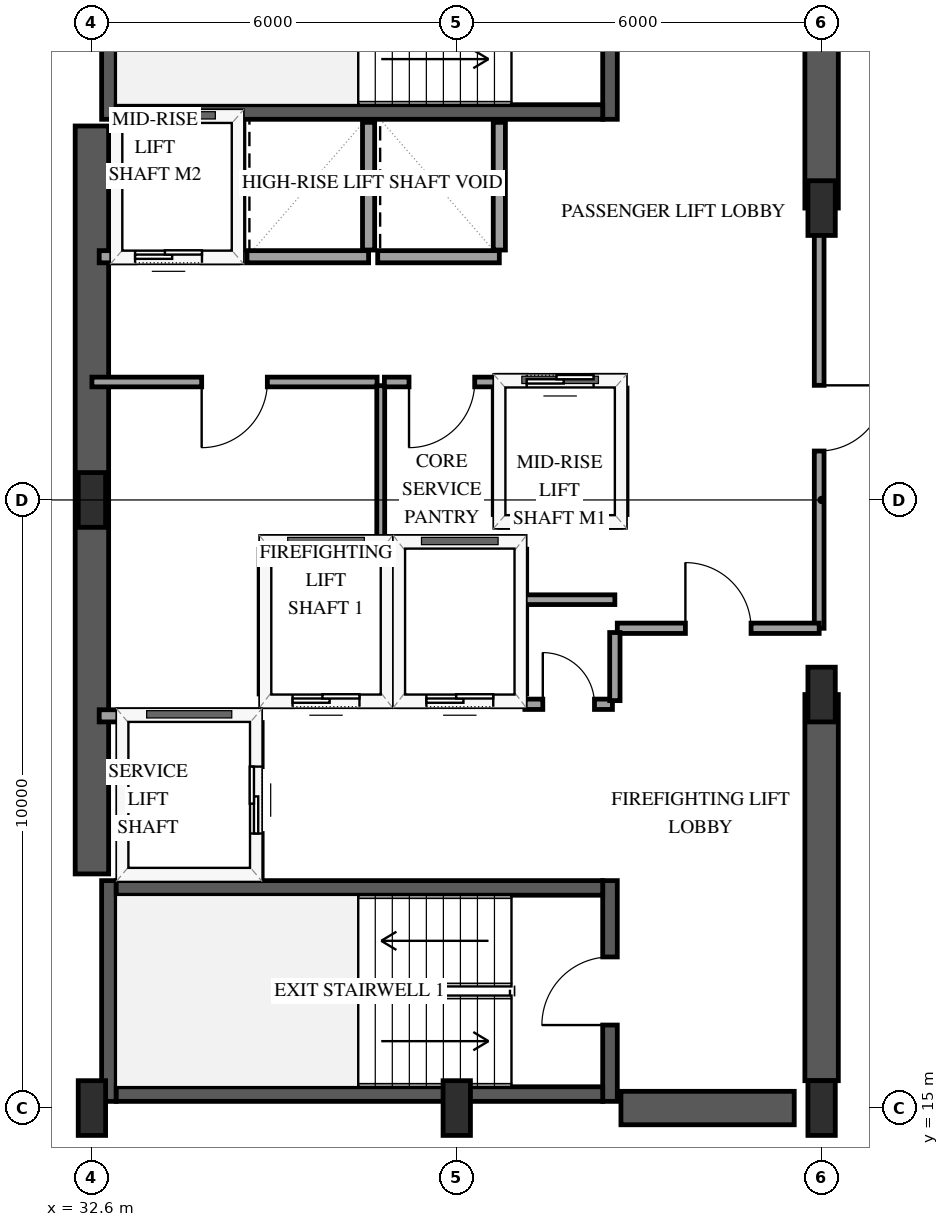
"""IFC4 building model, lengths in metres.
Left out: names, types, materials, properties, quantities, classifications, styles, units other than length and angle.
Written with IfcOpenShell. Run it as: python <this file> out.ifc"""

import sys

from ifc_helpers import new_model, si_unit, direction, frame, frame_2d, origin, origin_2d, place, context, subcontext, project, spatial, rectangle, extrude, element, fill, save


model = new_model("IFC4")
c1 = context("Model", 3, precision=1e-05, world=origin(), true_north=direction((0.0, 1.0)))
c2 = subcontext(c1, "Body", "Model", "MODEL_VIEW")
j1 = project(units=[si_unit("LENGTHUNIT", "METRE"), si_unit("PLANEANGLEUNIT", "RADIAN")], contexts=[c1])
p1 = place(None, origin())
s1 = spatial("IfcSite", under=j1, at=p1, CompositionType="ELEMENT")
p2 = place(p1, origin())
s2 = spatial("IfcBuilding", under=s1, at=p2, CompositionType="ELEMENT")
p3 = place(p2, frame((0.0, 0.0, 146.2)))
s3 = spatial("IfcBuildingStorey", under=s2, at=p3, CompositionType="ELEMENT", Elevation=146.2)
p4 = place(p3, frame((32.88, 15.11, 0.0), z_axis=(0.0, 0.0, 1.0), x_axis=(0.0, 1.0, 0.0)))
e1 = element("IfcWall", 1, at=p4, inside=s3, PredefinedType="SHEAR", context=c2, shape_type="SweptSolid", body=[
    extrude(rectangle(XDim=3.63, YDim=0.24, at=frame_2d((1.815, 0.0))), origin(), (0.0, 0.0, 1.0), 3.6),
])
p5 = place(p3, frame((41.12, 15.11, 0.0), z_axis=(0.0, 0.0, 1.0), x_axis=(0.0, 1.0, 0.0)))
e2 = element("IfcWall", 2, at=p5, inside=s3, PredefinedType="SHEAR", context=c2, shape_type="SweptSolid", body=[
    extrude(rectangle(XDim=3.63, YDim=0.24, at=frame_2d((1.815, 0.0))), origin(), (0.0, 0.0, 1.0), 3.6),
])
p6 = place(p5, frame((1.255, 0.0, 0.0)))
e3 = element("IfcOpeningElement", 3, at=p6, cuts=e2, PredefinedType="OPENING", context=c2, shape_type="SweptSolid", body=[
    extrude(rectangle(XDim=1.12, YDim=2.15, at=frame_2d((0.56, 1.075))), frame((0.0, 0.13, 0.0), z_axis=(0.0, -1.0, 0.0), x_axis=(1.0, 0.0, 0.0)), (0.0, 0.0, 1.0), 0.26),
])
for number, where, z_axis, x_axis in (
    (4, (33.0, 15.23, 0.0), (0.0, 0.0, 1.0), (1.0, 0.0, 0.0)),
    (5, (33.0, 18.62, 0.0), (0.0, 0.0, 1.0), (1.0, 0.0, 0.0)),
):
    element("IfcWall", number, at=place(p3, frame(where, z_axis=z_axis, x_axis=x_axis)), inside=s3, PredefinedType="SHEAR", context=c2, shape_type="SweptSolid", body=[
        extrude(rectangle(XDim=8.0, YDim=0.24, at=frame_2d((4.0, 0.0))), origin(), (0.0, 0.0, 1.0), 3.6),
    ])
p7 = place(p3, frame((32.88, 31.26, 0.0), z_axis=(0.0, 0.0, 1.0), x_axis=(0.0, 1.0, 0.0)))
e6 = element("IfcWall", 6, at=p7, inside=s3, PredefinedType="SHEAR", context=c2, shape_type="SweptSolid", body=[
    extrude(rectangle(XDim=3.63, YDim=0.24, at=frame_2d((1.815, 0.0))), origin(), (0.0, 0.0, 1.0), 3.6),
])
p8 = place(p3, frame((41.12, 31.26, 0.0), z_axis=(0.0, 0.0, 1.0), x_axis=(0.0, 1.0, 0.0)))
e7 = element("IfcWall", 7, at=p8, inside=s3, PredefinedType="SHEAR", context=c2, shape_type="SweptSolid", body=[
    extrude(rectangle(XDim=3.63, YDim=0.24, at=frame_2d((1.815, 0.0))), origin(), (0.0, 0.0, 1.0), 3.6),
])
p9 = place(p8, frame((1.255, 0.0, 0.0)))
e8 = element("IfcOpeningElement", 8, at=p9, cuts=e7, PredefinedType="OPENING", context=c2, shape_type="SweptSolid", body=[
    extrude(rectangle(XDim=1.12, YDim=2.15, at=frame_2d((0.56, 1.075))), frame((0.0, 0.13, 0.0), z_axis=(0.0, -1.0, 0.0), x_axis=(1.0, 0.0, 0.0)), (0.0, 0.0, 1.0), 0.26),
])
p10 = place(p3, frame((33.0, 31.38, 0.0), z_axis=(0.0, 0.0, 1.0), x_axis=(1.0, 0.0, 0.0)))
e9 = element("IfcWall", 9, at=p10, inside=s3, PredefinedType="SHEAR", context=c2, shape_type="SweptSolid", body=[
    extrude(rectangle(XDim=8.0, YDim=0.24, at=frame_2d((4.0, 0.0))), origin(), (0.0, 0.0, 1.0), 3.6),
])
p11 = place(p3, frame((32.6, 18.85, 0.0), z_axis=(0.0, 0.0, 1.0), x_axis=(0.0, 1.0, 0.0)))
e10 = element("IfcWall", 10, at=p11, inside=s3, PredefinedType="SHEAR", context=c2, shape_type="SweptSolid", body=[
    extrude(rectangle(XDim=12.3, YDim=0.55, at=frame_2d((6.15, 0.0))), origin(), (0.0, 0.0, 1.0), 3.6),
])
p12 = place(p3, frame((41.3, 15.0, 0.0), z_axis=(0.0, 0.0, 1.0), x_axis=(1.0, 0.0, 0.0)))
e11 = element("IfcWall", 11, at=p12, inside=s3, PredefinedType="SHEAR", context=c2, shape_type="SweptSolid", body=[
    extrude(rectangle(XDim=2.85, YDim=0.55, at=frame_2d((1.425, 0.0))), origin(), (0.0, 0.0, 1.0), 3.6),
])
p13 = place(p3, frame((44.6, 15.45, 0.0), z_axis=(0.0, 0.0, 1.0), x_axis=(0.0, 1.0, 0.0)))
e12 = element("IfcWall", 12, at=p13, inside=s3, PredefinedType="SHEAR", context=c2, shape_type="SweptSolid", body=[
    extrude(rectangle(XDim=6.35, YDim=0.55, at=frame_2d((3.175, 0.0))), origin(), (0.0, 0.0, 1.0), 3.6),
])
p14 = place(p3, frame((44.6, 29.8, 0.0), z_axis=(0.0, 0.0, 1.0), x_axis=(0.0, 1.0, 0.0)))
e13 = element("IfcWall", 13, at=p14, inside=s3, PredefinedType="SHEAR", context=c2, shape_type="SweptSolid", body=[
    extrude(rectangle(XDim=4.75, YDim=0.55, at=frame_2d((2.375, 0.0))), origin(), (0.0, 0.0, 1.0), 3.6),
])
for number, where, z_axis, x_axis in (
    (14, (32.6, 15.0, 0.0), (0.0, 0.0, 1.0), (1.0, 0.0, 0.0)),
    (15, (32.6, 25.0, 0.0), (0.0, 0.0, 1.0), (1.0, 0.0, 0.0)),
    (16, (38.6, 15.0, 0.0), (0.0, 0.0, 1.0), (1.0, 0.0, 0.0)),
    (17, (44.6, 15.0, 0.0), (0.0, 0.0, 1.0), (1.0, 0.0, 0.0)),
    (18, (44.6, 21.8, 0.0), (0.0, 0.0, 1.0), (1.0, 0.0, 0.0)),
    (19, (44.6, 29.8, 0.0), (0.0, 0.0, 1.0), (1.0, 0.0, 0.0)),
):
    element("IfcColumn", number, at=place(p3, frame(where, z_axis=z_axis, x_axis=x_axis)), inside=s3, PredefinedType="PILASTER", context=c2, shape_type="SweptSolid", body=[
        extrude(rectangle(XDim=0.45, YDim=0.9, at=origin_2d()), origin(), (0.0, 0.0, 1.0), 3.6),
    ])
p15 = place(p3, frame((35.45, 21.7, 0.0), z_axis=(0.0, 0.0, 1.0), x_axis=(1.0, 0.0, 0.0)))
e20 = element("IfcWall", 20, at=p15, inside=s3, PredefinedType="SOLIDWALL", context=c2, shape_type="SweptSolid", body=[
    extrude(rectangle(XDim=2.0, YDim=0.2, at=frame_2d((1.0, 0.0))), origin(), (0.0, 0.0, 1.0), 3.3),
])
p16 = place(p15, frame((0.45, 0.0, 0.0)))
e21 = element("IfcOpeningElement", 21, at=p16, cuts=e20, PredefinedType="OPENING", context=c2, shape_type="SweptSolid", body=[
    extrude(rectangle(XDim=1.1, YDim=2.15, at=frame_2d((0.55, 1.075))), frame((0.0, 0.11, 0.0), z_axis=(0.0, -1.0, 0.0), x_axis=(1.0, 0.0, 0.0)), (0.0, 0.0, 1.0), 0.22),
])
p17 = place(p3, frame((35.45, 24.3, 0.0), z_axis=(0.0, 0.0, 1.0), x_axis=(1.0, 0.0, 0.0)))
e22 = element("IfcWall", 22, at=p17, inside=s3, PredefinedType="SOLIDWALL", context=c2, shape_type="SweptSolid", body=[
    extrude(rectangle(XDim=2.0, YDim=0.2, at=frame_2d((1.0, 0.0))), origin(), (0.0, 0.0, 1.0), 3.3),
])
for number, where, z_axis, x_axis in (
    (23, (35.45, 21.81, 0.0), (0.0, 0.0, 1.0), (0.0, 1.0, 0.0)),
    (24, (37.45, 21.81, 0.0), (0.0, 0.0, 1.0), (0.0, 1.0, 0.0)),
):
    element("IfcWall", number, at=place(p3, frame(where, z_axis=z_axis, x_axis=x_axis)), inside=s3, PredefinedType="SOLIDWALL", context=c2, shape_type="SweptSolid", body=[
        extrude(rectangle(XDim=2.38, YDim=0.2, at=frame_2d((1.19, 0.0))), origin(), (0.0, 0.0, 1.0), 3.3),
    ])
p18 = place(p3, frame((37.65, 21.7, 0.0), z_axis=(0.0, 0.0, 1.0), x_axis=(1.0, 0.0, 0.0)))
e25 = element("IfcWall", 25, at=p18, inside=s3, PredefinedType="SOLIDWALL", context=c2, shape_type="SweptSolid", body=[
    extrude(rectangle(XDim=2.0, YDim=0.2, at=frame_2d((1.0, 0.0))), origin(), (0.0, 0.0, 1.0), 3.3),
])
p19 = place(p18, frame((0.45, 0.0, 0.0)))
e26 = element("IfcOpeningElement", 26, at=p19, cuts=e25, PredefinedType="OPENING", context=c2, shape_type="SweptSolid", body=[
    extrude(rectangle(XDim=1.1, YDim=2.15, at=frame_2d((0.55, 1.075))), frame((0.0, 0.11, 0.0), z_axis=(0.0, -1.0, 0.0), x_axis=(1.0, 0.0, 0.0)), (0.0, 0.0, 1.0), 0.22),
])
p20 = place(p3, frame((37.65, 24.3, 0.0), z_axis=(0.0, 0.0, 1.0), x_axis=(1.0, 0.0, 0.0)))
e27 = element("IfcWall", 27, at=p20, inside=s3, PredefinedType="SOLIDWALL", context=c2, shape_type="SweptSolid", body=[
    extrude(rectangle(XDim=2.0, YDim=0.2, at=frame_2d((1.0, 0.0))), origin(), (0.0, 0.0, 1.0), 3.3),
])
p21 = place(p3, frame((39.65, 21.81, 0.0), z_axis=(0.0, 0.0, 1.0), x_axis=(0.0, 1.0, 0.0)))
e28 = element("IfcWall", 28, at=p21, inside=s3, PredefinedType="SOLIDWALL", context=c2, shape_type="SweptSolid", body=[
    extrude(rectangle(XDim=2.38, YDim=0.2, at=frame_2d((1.19, 0.0))), origin(), (0.0, 0.0, 1.0), 3.3),
])
p22 = place(p3, frame((32.72, 21.45, 0.0), z_axis=(0.0, 0.0, 1.0), x_axis=(1.0, 0.0, 0.0)))
e29 = element("IfcWall", 29, at=p22, inside=s3, PredefinedType="SOLIDWALL", context=c2, shape_type="SweptSolid", body=[
    extrude(rectangle(XDim=2.58, YDim=0.2, at=frame_2d((1.29, 0.0))), origin(), (0.0, 0.0, 1.0), 3.3),
])
p23 = place(p3, frame((35.3, 18.79, 0.0), z_axis=(0.0, 0.0, 1.0), x_axis=(0.0, 1.0, 0.0)))
e30 = element("IfcWall", 30, at=p23, inside=s3, PredefinedType="SOLIDWALL", context=c2, shape_type="SweptSolid", body=[
    extrude(rectangle(XDim=2.55, YDim=0.2, at=frame_2d((1.275, 0.0))), origin(), (0.0, 0.0, 1.0), 3.3),
])
p24 = place(p23, frame((0.725, 0.0, 0.0)))
e31 = element("IfcOpeningElement", 31, at=p24, cuts=e30, PredefinedType="OPENING", context=c2, shape_type="SweptSolid", body=[
    extrude(rectangle(XDim=1.1, YDim=2.15, at=frame_2d((0.55, 1.075))), frame((0.0, 0.11, 0.0), z_axis=(0.0, -1.0, 0.0), x_axis=(1.0, 0.0, 0.0)), (0.0, 0.0, 1.0), 0.22),
])
p25 = place(p3, frame((39.3, 24.65, 0.0), z_axis=(0.0, 0.0, 1.0), x_axis=(1.0, 0.0, 0.0)))
e32 = element("IfcWall", 32, at=p25, inside=s3, PredefinedType="SOLIDWALL", context=c2, shape_type="SweptSolid", body=[
    extrude(rectangle(XDim=2.0, YDim=0.2, at=frame_2d((1.0, 0.0))), origin(), (0.0, 0.0, 1.0), 3.3),
])
p26 = place(p3, frame((39.3, 26.95, 0.0), z_axis=(0.0, 0.0, 1.0), x_axis=(1.0, 0.0, 0.0)))
e33 = element("IfcWall", 33, at=p26, inside=s3, PredefinedType="SOLIDWALL", context=c2, shape_type="SweptSolid", body=[
    extrude(rectangle(XDim=2.0, YDim=0.2, at=frame_2d((1.0, 0.0))), origin(), (0.0, 0.0, 1.0), 3.3),
])
p27 = place(p26, frame((0.45, 0.0, 0.0)))
e34 = element("IfcOpeningElement", 34, at=p27, cuts=e33, PredefinedType="OPENING", context=c2, shape_type="SweptSolid", body=[
    extrude(rectangle(XDim=1.1, YDim=2.15, at=frame_2d((0.55, 1.075))), frame((0.0, 0.11, 0.0), z_axis=(0.0, -1.0, 0.0), x_axis=(1.0, 0.0, 0.0)), (0.0, 0.0, 1.0), 0.22),
])
for number, where, z_axis, x_axis in (
    (35, (39.3, 24.76, 0.0), (0.0, 0.0, 1.0), (0.0, 1.0, 0.0)),
    (36, (41.3, 24.76, 0.0), (0.0, 0.0, 1.0), (0.0, 1.0, 0.0)),
):
    element("IfcWall", number, at=place(p3, frame(where, z_axis=z_axis, x_axis=x_axis)), inside=s3, PredefinedType="SOLIDWALL", context=c2, shape_type="SweptSolid", body=[
        extrude(rectangle(XDim=2.08, YDim=0.2, at=frame_2d((1.04, 0.0))), origin(), (0.0, 0.0, 1.0), 3.3),
    ])
p28 = place(p3, frame((32.72, 29.0, 0.0), z_axis=(0.0, 0.0, 1.0), x_axis=(1.0, 0.0, 0.0)))
e37 = element("IfcWall", 37, at=p28, inside=s3, PredefinedType="SOLIDWALL", context=c2, shape_type="SweptSolid", body=[
    extrude(rectangle(XDim=2.28, YDim=0.2, at=frame_2d((1.14, 0.0))), origin(), (0.0, 0.0, 1.0), 3.3),
])
p29 = place(p28, frame((0.59, 0.0, 0.0)))
e38 = element("IfcOpeningElement", 38, at=p29, cuts=e37, PredefinedType="OPENING", context=c2, shape_type="SweptSolid", body=[
    extrude(rectangle(XDim=1.1, YDim=2.15, at=frame_2d((0.55, 1.075))), frame((0.0, 0.11, 0.0), z_axis=(0.0, -1.0, 0.0), x_axis=(1.0, 0.0, 0.0)), (0.0, 0.0, 1.0), 0.22),
])
p30 = place(p3, frame((35.0, 29.11, 0.0), z_axis=(0.0, 0.0, 1.0), x_axis=(0.0, 1.0, 0.0)))
e39 = element("IfcWall", 39, at=p30, inside=s3, PredefinedType="SOLIDWALL", context=c2, shape_type="SweptSolid", body=[
    extrude(rectangle(XDim=2.1, YDim=0.2, at=frame_2d((1.05, 0.0))), origin(), (0.0, 0.0, 1.0), 3.3),
])
p31 = place(p3, frame((35.15, 29.0, 0.0), z_axis=(0.0, 0.0, 1.0), x_axis=(1.0, 0.0, 0.0)))
e40 = element("IfcWall", 40, at=p31, inside=s3, PredefinedType="SOLIDWALL", context=c2, shape_type="SweptSolid", body=[
    extrude(rectangle(XDim=2.0, YDim=0.2, at=frame_2d((1.0, 0.0))), origin(), (0.0, 0.0, 1.0), 3.3),
])
p32 = place(p3, frame((37.15, 29.11, 0.0), z_axis=(0.0, 0.0, 1.0), x_axis=(0.0, 1.0, 0.0)))
e41 = element("IfcWall", 41, at=p32, inside=s3, PredefinedType="SOLIDWALL", context=c2, shape_type="SweptSolid", body=[
    extrude(rectangle(XDim=2.1, YDim=0.2, at=frame_2d((1.05, 0.0))), origin(), (0.0, 0.0, 1.0), 3.3),
])
p33 = place(p3, frame((37.3, 29.0, 0.0), z_axis=(0.0, 0.0, 1.0), x_axis=(1.0, 0.0, 0.0)))
e42 = element("IfcWall", 42, at=p33, inside=s3, PredefinedType="SOLIDWALL", context=c2, shape_type="SweptSolid", body=[
    extrude(rectangle(XDim=2.0, YDim=0.2, at=frame_2d((1.0, 0.0))), origin(), (0.0, 0.0, 1.0), 3.3),
])
p34 = place(p3, frame((39.3, 29.11, 0.0), z_axis=(0.0, 0.0, 1.0), x_axis=(0.0, 1.0, 0.0)))
e43 = element("IfcWall", 43, at=p34, inside=s3, PredefinedType="SOLIDWALL", context=c2, shape_type="SweptSolid", body=[
    extrude(rectangle(XDim=2.1, YDim=0.2, at=frame_2d((1.05, 0.0))), origin(), (0.0, 0.0, 1.0), 3.3),
])
p35 = place(p3, frame((44.56, 29.8, 0.0), z_axis=(0.0, 0.0, 1.0), x_axis=(0.0, -1.0, 0.0)))
e44 = element("IfcWall", 44, at=p35, inside=s3, PredefinedType="PARTITIONING", context=c2, shape_type="SweptSolid", body=[
    extrude(rectangle(XDim=6.91, YDim=0.16, at=frame_2d((3.455, 0.0))), origin(), (0.0, 0.0, 1.0), 2.34),
])
p36 = place(p35, frame((2.915, 0.0, 0.0)))
e45 = element("IfcOpeningElement", 45, at=p36, cuts=e44, PredefinedType="OPENING", context=c2, shape_type="SweptSolid", body=[
    extrude(rectangle(XDim=1.08, YDim=2.15, at=frame_2d((0.54, 1.075))), frame((0.0, 0.09, 0.0), z_axis=(0.0, -1.0, 0.0), x_axis=(1.0, 0.0, 0.0)), (0.0, 0.0, 1.0), 0.18),
])
p37 = place(p3, frame((37.29, 26.94, 0.0), z_axis=(0.0, 0.0, 1.0), x_axis=(-1.0, 0.0, 0.0)))
e46 = element("IfcWall", 46, at=p37, inside=s3, PredefinedType="PARTITIONING", context=c2, shape_type="SweptSolid", body=[
    extrude(rectangle(XDim=4.69, YDim=0.16, at=frame_2d((2.345, 0.0))), origin(), (0.0, 0.0, 1.0), 3.3),
])
p38 = place(p37, frame((1.805, 0.0, 0.0)))
e47 = element("IfcOpeningElement", 47, at=p38, cuts=e46, PredefinedType="OPENING", context=c2, shape_type="SweptSolid", body=[
    extrude(rectangle(XDim=1.08, YDim=2.15, at=frame_2d((0.54, 1.075))), frame((0.0, 0.09, 0.0), z_axis=(0.0, -1.0, 0.0), x_axis=(1.0, 0.0, 0.0)), (0.0, 0.0, 1.0), 0.18),
])
p39 = place(p3, frame((41.24, 22.89, 0.0), z_axis=(0.0, 0.0, 1.0), x_axis=(1.0, 0.0, 0.0)))
e48 = element("IfcWall", 48, at=p39, inside=s3, PredefinedType="PARTITIONING", context=c2, shape_type="SweptSolid", body=[
    extrude(rectangle(XDim=3.32, YDim=0.17, at=frame_2d((1.66, 0.0))), origin(), (0.0, 0.0, 1.0), 3.3),
])
p40 = place(p39, frame((1.12, 0.0, 0.0)))
e49 = element("IfcOpeningElement", 49, at=p40, cuts=e48, PredefinedType="OPENING", context=c2, shape_type="SweptSolid", body=[
    extrude(rectangle(XDim=1.08, YDim=2.15, at=frame_2d((0.54, 1.075))), frame((0.0, 0.095, 0.0), z_axis=(0.0, -1.0, 0.0), x_axis=(1.0, 0.0, 0.0)), (0.0, 0.0, 1.0), 0.19),
])
p41 = place(p3, frame((37.35, 26.88, 0.0), z_axis=(0.0, 0.0, 1.0), x_axis=(0.0, -1.0, 0.0)))
e50 = element("IfcWall", 50, at=p41, inside=s3, PredefinedType="PARTITIONING", context=c2, shape_type="SweptSolid", body=[
    extrude(rectangle(XDim=2.58, YDim=0.13, at=frame_2d((1.29, 0.0))), origin(), (0.0, 0.0, 1.0), 3.3),
])
p42 = place(p3, frame((39.3, 26.94, 0.0), z_axis=(0.0, 0.0, 1.0), x_axis=(-1.0, 0.0, 0.0)))
e51 = element("IfcWall", 51, at=p42, inside=s3, PredefinedType="PARTITIONING", context=c2, shape_type="SweptSolid", body=[
    extrude(rectangle(XDim=1.89, YDim=0.16, at=frame_2d((0.945, 0.0))), origin(), (0.0, 0.0, 1.0), 3.3),
])
p43 = place(p42, frame((0.405, 0.0, 0.0)))
e52 = element("IfcOpeningElement", 52, at=p43, cuts=e51, PredefinedType="OPENING", context=c2, shape_type="SweptSolid", body=[
    extrude(rectangle(XDim=1.08, YDim=2.15, at=frame_2d((0.54, 1.075))), frame((0.0, 0.09, 0.0), z_axis=(0.0, -1.0, 0.0), x_axis=(1.0, 0.0, 0.0)), (0.0, 0.0, 1.0), 0.18),
])
p44 = place(p3, frame((39.72, 21.64, 0.0), z_axis=(0.0, 0.0, 1.0), x_axis=(1.0, 0.0, 0.0)))
e53 = element("IfcWall", 53, at=p44, inside=s3, PredefinedType="PARTITIONING", context=c2, shape_type="SweptSolid", body=[
    extrude(rectangle(XDim=1.44, YDim=0.17, at=frame_2d((0.72, 0.0))), origin(), (0.0, 0.0, 1.0), 3.3),
])
p45 = place(p44, frame((0.295, 0.0, 0.0)))
e54 = element("IfcOpeningElement", 54, at=p45, cuts=e53, PredefinedType="OPENING", context=c2, shape_type="SweptSolid", body=[
    extrude(rectangle(XDim=0.85, YDim=2.1, at=frame_2d((0.425, 1.05))), frame((0.0, 0.095, 0.0), z_axis=(0.0, -1.0, 0.0), x_axis=(1.0, 0.0, 0.0)), (0.0, 0.0, 1.0), 0.19),
])
p46 = place(p3, frame((41.2, 21.7, 0.0), z_axis=(0.0, 0.0, 1.0), x_axis=(0.0, 1.0, 0.0)))
e55 = element("IfcWall", 55, at=p46, inside=s3, PredefinedType="PARTITIONING", context=c2, shape_type="SweptSolid", body=[
    extrude(rectangle(XDim=1.12, YDim=0.17, at=frame_2d((0.56, 0.0))), origin(), (0.0, 0.0, 1.0), 3.3),
])
p47 = place(p3, frame((41.2, 23.36, 0.0), z_axis=(0.0, 0.0, 1.0), x_axis=(-1.0, 0.0, 0.0)))
e56 = element("IfcWall", 56, at=p47, inside=s3, PredefinedType="PARTITIONING", context=c2, shape_type="SweptSolid", body=[
    extrude(rectangle(XDim=1.48, YDim=0.16, at=frame_2d((0.74, 0.0))), origin(), (0.0, 0.0, 1.0), 3.3),
])
p48 = place(p16, origin())
e57 = element("IfcDoor", 57, at=p48, inside=s3, OperationType="SLIDING_TO_LEFT", PredefinedType="DOOR", context=c2, shape_type="SweptSolid", body=[
    extrude(rectangle(XDim=1.1, YDim=2.15, at=frame_2d((0.55, 1.075))), frame((0.0, 0.025, 0.0), z_axis=(0.0, -1.0, 0.0), x_axis=(1.0, 0.0, 0.0)), (0.0, 0.0, 1.0), 0.05),
])
fill(e21, e57)
p49 = place(p19, origin())
e58 = element("IfcDoor", 58, at=p49, inside=s3, OperationType="SLIDING_TO_LEFT", PredefinedType="DOOR", context=c2, shape_type="SweptSolid", body=[
    extrude(rectangle(XDim=1.1, YDim=2.15, at=frame_2d((0.55, 1.075))), frame((0.0, 0.025, 0.0), z_axis=(0.0, -1.0, 0.0), x_axis=(1.0, 0.0, 0.0)), (0.0, 0.0, 1.0), 0.05),
])
fill(e26, e58)
p50 = place(p24, origin())
e59 = element("IfcDoor", 59, at=p50, inside=s3, OperationType="SLIDING_TO_LEFT", PredefinedType="DOOR", context=c2, shape_type="SweptSolid", body=[
    extrude(rectangle(XDim=1.1, YDim=2.15, at=frame_2d((0.55, 1.075))), frame((0.0, 0.025, 0.0), z_axis=(0.0, -1.0, 0.0), x_axis=(1.0, 0.0, 0.0)), (0.0, 0.0, 1.0), 0.05),
])
fill(e31, e59)
p51 = place(p27, origin())
e60 = element("IfcDoor", 60, at=p51, inside=s3, OperationType="SLIDING_TO_LEFT", PredefinedType="DOOR", context=c2, shape_type="SweptSolid", body=[
    extrude(rectangle(XDim=1.1, YDim=2.15, at=frame_2d((0.55, 1.075))), frame((0.0, 0.025, 0.0), z_axis=(0.0, -1.0, 0.0), x_axis=(1.0, 0.0, 0.0)), (0.0, 0.0, 1.0), 0.05),
])
fill(e34, e60)
p52 = place(p29, origin())
e61 = element("IfcDoor", 61, at=p52, inside=s3, OperationType="SLIDING_TO_LEFT", PredefinedType="DOOR", context=c2, shape_type="SweptSolid", body=[
    extrude(rectangle(XDim=1.1, YDim=2.15, at=frame_2d((0.55, 1.075))), frame((0.0, 0.025, 0.0), z_axis=(0.0, -1.0, 0.0), x_axis=(1.0, 0.0, 0.0)), (0.0, 0.0, 1.0), 0.05),
])
fill(e38, e61)
p53 = place(p6, origin())
e62 = element("IfcDoor", 62, at=p53, inside=s3, OperationType="SINGLE_SWING_LEFT", PredefinedType="DOOR", context=c2, shape_type="SweptSolid", body=[
    extrude(rectangle(XDim=1.12, YDim=2.15, at=frame_2d((0.56, 1.075))), frame((0.0, 0.025, 0.0), z_axis=(0.0, -1.0, 0.0), x_axis=(1.0, 0.0, 0.0)), (0.0, 0.0, 1.0), 0.05),
])
fill(e3, e62)
p54 = place(p36, origin())
e63 = element("IfcDoor", 63, at=p54, inside=s3, OperationType="SINGLE_SWING_LEFT", PredefinedType="DOOR", context=c2, shape_type="SweptSolid", body=[
    extrude(rectangle(XDim=1.08, YDim=2.15, at=frame_2d((0.54, 1.075))), frame((0.0, 0.025, 0.0), z_axis=(0.0, -1.0, 0.0), x_axis=(1.0, 0.0, 0.0)), (0.0, 0.0, 1.0), 0.05),
])
fill(e45, e63)
p55 = place(p38, origin())
e64 = element("IfcDoor", 64, at=p55, inside=s3, OperationType="SINGLE_SWING_RIGHT", PredefinedType="DOOR", context=c2, shape_type="SweptSolid", body=[
    extrude(rectangle(XDim=1.08, YDim=2.15, at=frame_2d((0.54, 1.075))), frame((0.0, 0.025, 0.0), z_axis=(0.0, -1.0, 0.0), x_axis=(1.0, 0.0, 0.0)), (0.0, 0.0, 1.0), 0.05),
])
fill(e47, e64)
p56 = place(p40, origin())
e65 = element("IfcDoor", 65, at=p56, inside=s3, OperationType="SINGLE_SWING_LEFT", PredefinedType="DOOR", context=c2, shape_type="SweptSolid", body=[
    extrude(rectangle(XDim=1.08, YDim=2.15, at=frame_2d((0.54, 1.075))), frame((0.0, 0.025, 0.0), z_axis=(0.0, -1.0, 0.0), x_axis=(1.0, 0.0, 0.0)), (0.0, 0.0, 1.0), 0.05),
])
fill(e49, e65)
p57 = place(p43, origin())
e66 = element("IfcDoor", 66, at=p57, inside=s3, OperationType="SINGLE_SWING_RIGHT", PredefinedType="DOOR", context=c2, shape_type="SweptSolid", body=[
    extrude(rectangle(XDim=1.08, YDim=2.15, at=frame_2d((0.54, 1.075))), frame((0.0, 0.025, 0.0), z_axis=(0.0, -1.0, 0.0), x_axis=(1.0, 0.0, 0.0)), (0.0, 0.0, 1.0), 0.05),
])
fill(e52, e66)
p58 = place(p45, origin())
e67 = element("IfcDoor", 67, at=p58, inside=s3, OperationType="SINGLE_SWING_LEFT", PredefinedType="DOOR", context=c2, shape_type="SweptSolid", body=[
    extrude(rectangle(XDim=0.85, YDim=2.1, at=frame_2d((0.425, 1.05))), frame((0.0, 0.025, 0.0), z_axis=(0.0, -1.0, 0.0), x_axis=(1.0, 0.0, 0.0)), (0.0, 0.0, 1.0), 0.05),
])
fill(e54, e67)
save(model, sys.argv[1])
